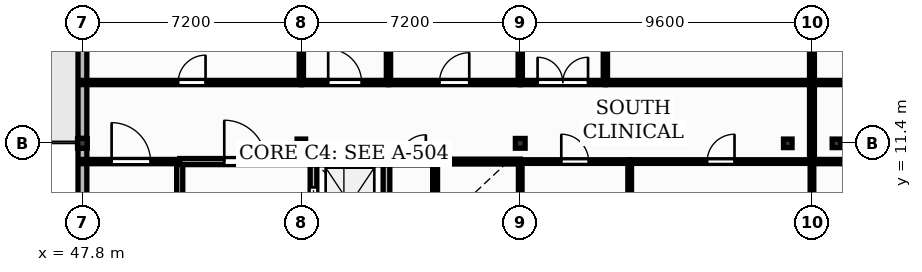
"""IFC4 building model, lengths in metres.
Left out: names, types, materials, properties, quantities, classifications, styles, units other than length and angle.
Written with IfcOpenShell. Run it as: python <this file> out.ifc"""

import sys

from ifc_helpers import new_model, si_unit, direction, frame, frame_2d, origin, origin_2d, place, context, subcontext, project, spatial, rectangle, extrude, element, fill, save


model = new_model("IFC4")
c1 = context("Model", 3, precision=1e-05, world=origin(), true_north=direction((0.0, 1.0)))
c2 = subcontext(c1, "Body", "Model", "MODEL_VIEW")
j1 = project(units=[si_unit("LENGTHUNIT", "METRE"), si_unit("PLANEANGLEUNIT", "RADIAN")], contexts=[c1])
p1 = place(None, origin())
s1 = spatial("IfcSite", under=j1, at=p1, CompositionType="ELEMENT")
p2 = place(p1, origin())
s2 = spatial("IfcBuilding", under=s1, at=p2, CompositionType="ELEMENT")
p3 = place(p2, frame((0.0, 0.0, 13.2)))
s3 = spatial("IfcBuildingStorey", under=s2, at=p3, CompositionType="ELEMENT", Elevation=13.2)
p4 = place(p3, frame((72.6, 11.4, 0.0), z_axis=(0.0, 0.0, 1.0), x_axis=(1.0, 0.0, 0.0)))
e1 = element("IfcColumn", 1, at=p4, inside=s3, PredefinedType="COLUMN", context=c2, shape_type="SweptSolid", body=[
    extrude(rectangle(XDim=0.28, YDim=0.28, at=origin_2d()), origin(), (0.0, 0.0, 1.0), 6.045),
])
p5 = place(p3, frame((47.8, 11.4, 0.0), z_axis=(0.0, 0.0, 1.0), x_axis=(1.0, 0.0, 0.0)))
e2 = element("IfcColumn", 2, at=p5, inside=s3, PredefinedType="COLUMN", context=c2, shape_type="SweptSolid", body=[
    extrude(rectangle(XDim=0.32, YDim=0.32, at=origin_2d()), origin(), (0.0, 0.0, 1.0), 6.045),
])
p6 = place(p3, frame((55.0, 11.4, 0.0), z_axis=(0.0, 0.0, 1.0), x_axis=(1.0, 0.0, 0.0)))
e3 = element("IfcColumn", 3, at=p6, inside=s3, PredefinedType="COLUMN", context=c2, shape_type="SweptSolid", body=[
    extrude(rectangle(XDim=0.28, YDim=0.28, at=origin_2d()), origin(), (0.0, 0.0, 1.0), 6.045),
])
p7 = place(p3, frame((62.2, 11.4, 0.0), z_axis=(0.0, 0.0, 1.0), x_axis=(1.0, 0.0, 0.0)))
e4 = element("IfcColumn", 4, at=p7, inside=s3, PredefinedType="COLUMN", context=c2, shape_type="SweptSolid", body=[
    extrude(rectangle(XDim=0.32, YDim=0.32, at=origin_2d()), origin(), (0.0, 0.0, 1.0), 6.045),
])
p8 = place(p3, frame((71.0, 11.4, 0.0), z_axis=(0.0, 0.0, 1.0), x_axis=(1.0, 0.0, 0.0)))
e5 = element("IfcColumn", 5, at=p8, inside=s3, PredefinedType="COLUMN", context=c2, shape_type="SweptSolid", body=[
    extrude(rectangle(XDim=0.28, YDim=0.28, at=origin_2d()), origin(), (0.0, 0.0, 1.0), 6.045),
])
p9 = place(p3, frame((47.8, 4.34, 0.0), z_axis=(0.0, 0.0, 1.0), x_axis=(0.0, 1.0, 0.0)))
e6 = element("IfcWall", 6, at=p9, inside=s3, PredefinedType="SOLIDWALL", context=c2, shape_type="SweptSolid", body=[
    extrude(rectangle(XDim=6.9, YDim=0.29, at=frame_2d((3.45, 0.0))), origin(), (0.0, 0.0, 1.0), 4.0),
])
p10 = place(p9, frame((1.77, 0.0, 0.9)))
e7 = element("IfcOpeningElement", 7, at=p10, cuts=e6, PredefinedType="OPENING", context=c2, shape_type="SweptSolid", body=[
    extrude(rectangle(XDim=1.18, YDim=2.4, at=frame_2d((0.59, 1.2))), frame((0.0, 0.155, 0.0), z_axis=(0.0, -1.0, 0.0), x_axis=(1.0, 0.0, 0.0)), (0.0, 0.0, 1.0), 0.31),
])
p11 = place(p9, frame((3.63, 0.0, 0.9)))
e8 = element("IfcOpeningElement", 8, at=p11, cuts=e6, PredefinedType="OPENING", context=c2, shape_type="SweptSolid", body=[
    extrude(rectangle(XDim=1.18, YDim=2.4, at=frame_2d((0.59, 1.2))), frame((0.0, 0.155, 0.0), z_axis=(0.0, -1.0, 0.0), x_axis=(1.0, 0.0, 0.0)), (0.0, 0.0, 1.0), 0.31),
])
p12 = place(p3, frame((47.8, 11.56, 0.0), z_axis=(0.0, 0.0, 1.0), x_axis=(0.0, 1.0, 0.0)))
e9 = element("IfcWall", 9, at=p12, inside=s3, PredefinedType="SOLIDWALL", context=c2, shape_type="SweptSolid", body=[
    extrude(rectangle(XDim=6.9, YDim=0.29, at=frame_2d((3.45, 0.0))), origin(), (0.0, 0.0, 1.0), 4.0),
])
p13 = place(p12, frame((2.925, 0.0, 0.0)))
e10 = element("IfcOpeningElement", 10, at=p13, cuts=e9, PredefinedType="OPENING", context=c2, shape_type="SweptSolid", body=[
    extrude(rectangle(XDim=1.05, YDim=2.2, at=frame_2d((0.525, 1.1))), frame((0.0, 0.155, 0.0), z_axis=(0.0, -1.0, 0.0), x_axis=(1.0, 0.0, 0.0)), (0.0, 0.0, 1.0), 0.31),
])
p14 = place(p12, frame((4.782, 0.0, 1.35)))
e11 = element("IfcOpeningElement", 11, at=p14, cuts=e9, PredefinedType="OPENING", context=c2, shape_type="SweptSolid", body=[
    extrude(rectangle(XDim=1.25, YDim=1.4, at=frame_2d((0.625, 0.7))), frame((0.0, 0.155, 0.0), z_axis=(0.0, -1.0, 0.0), x_axis=(1.0, 0.0, 0.0)), (0.0, 0.0, 1.0), 0.31),
])
p15 = place(p3, frame((55.4, 10.8, 0.0), z_axis=(0.0, 0.0, 1.0), x_axis=(1.0, 0.0, 0.0)))
e12 = element("IfcWall", 12, at=p15, inside=s3, PredefinedType="SOLIDWALL", context=c2, shape_type="SweptSolid", body=[
    extrude(rectangle(XDim=2.4, YDim=0.22, at=frame_2d((1.2, 0.0))), origin(), (0.0, 0.0, 1.0), 3.95),
])
p16 = place(p3, frame((55.4, 8.11, 0.0), z_axis=(0.0, 0.0, 1.0), x_axis=(0.0, 1.0, 0.0)))
e13 = element("IfcWall", 13, at=p16, inside=s3, PredefinedType="SOLIDWALL", context=c2, shape_type="SweptSolid", body=[
    extrude(rectangle(XDim=2.58, YDim=0.22, at=frame_2d((1.29, 0.0))), origin(), (0.0, 0.0, 1.0), 3.95),
])
p17 = place(p16, frame((0.74, 0.0, 0.0)))
e14 = element("IfcOpeningElement", 14, at=p17, cuts=e13, PredefinedType="OPENING", context=c2, shape_type="SweptSolid", body=[
    extrude(rectangle(XDim=1.1, YDim=2.15, at=frame_2d((0.55, 1.075))), frame((0.0, 0.12, 0.0), z_axis=(0.0, -1.0, 0.0), x_axis=(1.0, 0.0, 0.0)), (0.0, 0.0, 1.0), 0.24),
])
p18 = place(p3, frame((57.8, 8.11, 0.0), z_axis=(0.0, 0.0, 1.0), x_axis=(0.0, 1.0, 0.0)))
e15 = element("IfcWall", 15, at=p18, inside=s3, PredefinedType="SOLIDWALL", context=c2, shape_type="SweptSolid", body=[
    extrude(rectangle(XDim=2.58, YDim=0.22, at=frame_2d((1.29, 0.0))), origin(), (0.0, 0.0, 1.0), 3.95),
])
p19 = place(p3, frame((47.8, 10.8, 0.0), z_axis=(0.0, 0.0, 1.0), x_axis=(1.0, 0.0, 0.0)))
e16 = element("IfcWall", 16, at=p19, inside=s3, PredefinedType="PARTITIONING", context=c2, shape_type="SweptSolid", body=[
    extrude(rectangle(XDim=3.2, YDim=0.14, at=frame_2d((1.6, 0.0))), origin(), (0.0, 0.0, 1.0), 3.75),
])
p20 = place(p19, frame((0.96, 0.0, 0.0)))
e17 = element("IfcOpeningElement", 17, at=p20, cuts=e16, PredefinedType="OPENING", context=c2, shape_type="SweptSolid", body=[
    extrude(rectangle(XDim=1.28, YDim=2.2, at=frame_2d((0.64, 1.1))), frame((0.0, 0.08, 0.0), z_axis=(0.0, -1.0, 0.0), x_axis=(1.0, 0.0, 0.0)), (0.0, 0.0, 1.0), 0.16),
])
p21 = place(p3, frame((47.8, 13.4, 0.0), z_axis=(0.0, 0.0, 1.0), x_axis=(1.0, 0.0, 0.0)))
e18 = element("IfcWall", 18, at=p21, inside=s3, PredefinedType="PARTITIONING", context=c2, shape_type="SweptSolid", body=[
    extrude(rectangle(XDim=7.2, YDim=0.14, at=frame_2d((3.6, 0.0))), origin(), (0.0, 0.0, 1.0), 3.75),
])
p22 = place(p21, frame((3.15, 0.0, 0.0)))
e19 = element("IfcOpeningElement", 19, at=p22, cuts=e18, PredefinedType="OPENING", context=c2, shape_type="SweptSolid", body=[
    extrude(rectangle(XDim=0.9, YDim=2.1, at=frame_2d((0.45, 1.05))), frame((0.0, 0.08, 0.0), z_axis=(0.0, -1.0, 0.0), x_axis=(1.0, 0.0, 0.0)), (0.0, 0.0, 1.0), 0.16),
])
p23 = place(p3, frame((51.0, 5.4, 0.0), z_axis=(0.0, 0.0, 1.0), x_axis=(0.0, 1.0, 0.0)))
e20 = element("IfcWall", 20, at=p23, inside=s3, PredefinedType="PARTITIONING", context=c2, shape_type="SweptSolid", body=[
    extrude(rectangle(XDim=5.33, YDim=0.2, at=frame_2d((2.665, 0.0))), origin(), (0.0, 0.0, 1.0), 3.75),
])
p24 = place(p3, frame((51.0, 10.8, 0.0), z_axis=(0.0, 0.0, 1.0), x_axis=(1.0, 0.0, 0.0)))
e21 = element("IfcWall", 21, at=p24, inside=s3, PredefinedType="PARTITIONING", context=c2, shape_type="SweptSolid", body=[
    extrude(rectangle(XDim=4.29, YDim=0.2, at=frame_2d((2.145, 0.0))), origin(), (0.0, 0.0, 1.0), 3.75),
])
p25 = place(p24, frame((1.465, 0.0, 0.0)))
e22 = element("IfcOpeningElement", 22, at=p25, cuts=e21, PredefinedType="OPENING", context=c2, shape_type="SweptSolid", body=[
    extrude(rectangle(XDim=1.36, YDim=2.2, at=frame_2d((0.68, 1.1))), frame((0.0, 0.11, 0.0), z_axis=(0.0, -1.0, 0.0), x_axis=(1.0, 0.0, 0.0)), (0.0, 0.0, 1.0), 0.22),
])
p26 = place(p3, frame((55.0, 13.47, 0.0), z_axis=(0.0, 0.0, 1.0), x_axis=(0.0, 1.0, 0.0)))
e23 = element("IfcWall", 23, at=p26, inside=s3, PredefinedType="PARTITIONING", context=c2, shape_type="SweptSolid", body=[
    extrude(rectangle(XDim=4.97, YDim=0.14, at=frame_2d((2.485, 0.0))), origin(), (0.0, 0.0, 1.0), 3.75),
])
p27 = place(p3, frame((55.0, 13.4, 0.0), z_axis=(0.0, 0.0, 1.0), x_axis=(1.0, 0.0, 0.0)))
e24 = element("IfcWall", 24, at=p27, inside=s3, PredefinedType="PARTITIONING", context=c2, shape_type="SweptSolid", body=[
    extrude(rectangle(XDim=2.866, YDim=0.14, at=frame_2d((1.433, 0.0))), origin(), (0.0, 0.0, 1.0), 3.75),
])
p28 = place(p27, frame((0.883, 0.0, 0.0)))
e25 = element("IfcOpeningElement", 25, at=p28, cuts=e24, PredefinedType="OPENING", context=c2, shape_type="SweptSolid", body=[
    extrude(rectangle(XDim=1.1, YDim=2.1, at=frame_2d((0.55, 1.05))), frame((0.0, 0.08, 0.0), z_axis=(0.0, -1.0, 0.0), x_axis=(1.0, 0.0, 0.0)), (0.0, 0.0, 1.0), 0.16),
])
p29 = place(p3, frame((57.91, 10.8, 0.0), z_axis=(0.0, 0.0, 1.0), x_axis=(1.0, 0.0, 0.0)))
e26 = element("IfcWall", 26, at=p29, inside=s3, PredefinedType="SOLIDWALL", context=c2, shape_type="SweptSolid", body=[
    extrude(rectangle(XDim=1.49, YDim=0.22, at=frame_2d((0.745, 0.0))), origin(), (0.0, 0.0, 1.0), 3.75),
])
p30 = place(p29, frame((0.305, 0.0, 0.0)))
e27 = element("IfcOpeningElement", 27, at=p30, cuts=e26, PredefinedType="OPENING", context=c2, shape_type="SweptSolid", body=[
    extrude(rectangle(XDim=0.88, YDim=2.05, at=frame_2d((0.44, 1.025))), frame((0.0, 0.12, 0.0), z_axis=(0.0, -1.0, 0.0), x_axis=(1.0, 0.0, 0.0)), (0.0, 0.0, 1.0), 0.24),
])
p31 = place(p3, frame((57.866, 13.47, 0.0), z_axis=(0.0, 0.0, 1.0), x_axis=(0.0, 1.0, 0.0)))
e28 = element("IfcWall", 28, at=p31, inside=s3, PredefinedType="PARTITIONING", context=c2, shape_type="SweptSolid", body=[
    extrude(rectangle(XDim=5.13, YDim=0.14, at=frame_2d((2.565, 0.0))), origin(), (0.0, 0.0, 1.0), 3.75),
])
p32 = place(p3, frame((57.866, 13.4, 0.0), z_axis=(0.0, 0.0, 1.0), x_axis=(1.0, 0.0, 0.0)))
e29 = element("IfcWall", 29, at=p32, inside=s3, PredefinedType="PARTITIONING", context=c2, shape_type="SweptSolid", body=[
    extrude(rectangle(XDim=4.334, YDim=0.14, at=frame_2d((2.167, 0.0))), origin(), (0.0, 0.0, 1.0), 3.75),
])
p33 = place(p32, frame((1.677, 0.0, 0.0)))
e30 = element("IfcOpeningElement", 30, at=p33, cuts=e29, PredefinedType="OPENING", context=c2, shape_type="SweptSolid", body=[
    extrude(rectangle(XDim=0.98, YDim=2.15, at=frame_2d((0.49, 1.075))), frame((0.0, 0.08, 0.0), z_axis=(0.0, -1.0, 0.0), x_axis=(1.0, 0.0, 0.0)), (0.0, 0.0, 1.0), 0.16),
])
p34 = place(p3, frame((62.2, 10.8, 0.0), z_axis=(0.0, 0.0, 1.0), x_axis=(1.0, 0.0, 0.0)))
e31 = element("IfcWall", 31, at=p34, inside=s3, PredefinedType="PLUMBINGWALL", context=c2, shape_type="SweptSolid", body=[
    extrude(rectangle(XDim=3.6, YDim=0.12, at=frame_2d((1.8, 0.0))), origin(), (0.0, 0.0, 1.0), 3.75),
])
p35 = place(p34, frame((1.35, 0.0, 0.0)))
e32 = element("IfcOpeningElement", 32, at=p35, cuts=e31, PredefinedType="OPENING", context=c2, shape_type="SweptSolid", body=[
    extrude(rectangle(XDim=0.9, YDim=2.1, at=frame_2d((0.45, 1.05))), frame((0.0, 0.07, 0.0), z_axis=(0.0, -1.0, 0.0), x_axis=(1.0, 0.0, 0.0)), (0.0, 0.0, 1.0), 0.14),
])
p36 = place(p3, frame((62.2, 13.47, 0.0), z_axis=(0.0, 0.0, 1.0), x_axis=(0.0, 1.0, 0.0)))
e33 = element("IfcWall", 33, at=p36, inside=s3, PredefinedType="PARTITIONING", context=c2, shape_type="SweptSolid", body=[
    extrude(rectangle(XDim=4.99, YDim=0.14, at=frame_2d((2.495, 0.0))), origin(), (0.0, 0.0, 1.0), 3.75),
])
p37 = place(p3, frame((62.2, 13.4, 0.0), z_axis=(0.0, 0.0, 1.0), x_axis=(1.0, 0.0, 0.0)))
e34 = element("IfcWall", 34, at=p37, inside=s3, PredefinedType="PARTITIONING", context=c2, shape_type="SweptSolid", body=[
    extrude(rectangle(XDim=2.8, YDim=0.14, at=frame_2d((1.4, 0.0))), origin(), (0.0, 0.0, 1.0), 3.75),
])
p38 = place(p37, frame((0.57, 0.0, 0.0)))
e35 = element("IfcOpeningElement", 35, at=p38, cuts=e34, PredefinedType="OPENING", context=c2, shape_type="SweptSolid", body=[
    extrude(rectangle(XDim=1.66, YDim=2.3, at=frame_2d((0.83, 1.15))), frame((0.0, 0.08, 0.0), z_axis=(0.0, -1.0, 0.0), x_axis=(1.0, 0.0, 0.0)), (0.0, 0.0, 1.0), 0.16),
])
p39 = place(p3, frame((65.0, 13.47, 0.0), z_axis=(0.0, 0.0, 1.0), x_axis=(0.0, 1.0, 0.0)))
e36 = element("IfcWall", 36, at=p39, inside=s3, PredefinedType="PARTITIONING", context=c2, shape_type="SweptSolid", body=[
    extrude(rectangle(XDim=5.13, YDim=0.14, at=frame_2d((2.565, 0.0))), origin(), (0.0, 0.0, 1.0), 3.75),
])
p40 = place(p39, frame((2.115, 0.0, 0.0)))
e37 = element("IfcOpeningElement", 37, at=p40, cuts=e36, PredefinedType="OPENING", context=c2, shape_type="SweptSolid", body=[
    extrude(rectangle(XDim=0.9, YDim=2.1, at=frame_2d((0.45, 1.05))), frame((0.0, 0.08, 0.0), z_axis=(0.0, -1.0, 0.0), x_axis=(1.0, 0.0, 0.0)), (0.0, 0.0, 1.0), 0.16),
])
p41 = place(p3, frame((65.0, 13.4, 0.0), z_axis=(0.0, 0.0, 1.0), x_axis=(1.0, 0.0, 0.0)))
e38 = element("IfcWall", 38, at=p41, inside=s3, PredefinedType="PARTITIONING", context=c2, shape_type="SweptSolid", body=[
    extrude(rectangle(XDim=6.795, YDim=0.14, at=frame_2d((3.397, 0.0))), origin(), (0.0, 0.0, 1.0), 3.75),
])
p42 = place(p3, frame((65.8, 4.2, 0.0), z_axis=(0.0, 0.0, 1.0), x_axis=(0.0, 1.0, 0.0)))
e39 = element("IfcWall", 39, at=p42, inside=s3, PredefinedType="PLUMBINGWALL", context=c2, shape_type="SweptSolid", body=[
    extrude(rectangle(XDim=6.53, YDim=0.12, at=frame_2d((3.265, 0.0))), origin(), (0.0, 0.0, 1.0), 3.75),
])
p43 = place(p3, frame((65.8, 10.8, 0.0), z_axis=(0.0, 0.0, 1.0), x_axis=(1.0, 0.0, 0.0)))
e40 = element("IfcWall", 40, at=p43, inside=s3, PredefinedType="PLUMBINGWALL", context=c2, shape_type="SweptSolid", body=[
    extrude(rectangle(XDim=5.995, YDim=0.12, at=frame_2d((2.998, 0.0))), origin(), (0.0, 0.0, 1.0), 3.75),
])
p44 = place(p43, frame((2.548, 0.0, 0.0)))
e41 = element("IfcOpeningElement", 41, at=p44, cuts=e40, PredefinedType="OPENING", context=c2, shape_type="SweptSolid", body=[
    extrude(rectangle(XDim=0.9, YDim=2.1, at=frame_2d((0.45, 1.05))), frame((0.0, 0.07, 0.0), z_axis=(0.0, -1.0, 0.0), x_axis=(1.0, 0.0, 0.0)), (0.0, 0.0, 1.0), 0.14),
])
p45 = place(p3, frame((71.805, 10.8, 0.0), z_axis=(0.0, 0.0, 1.0), x_axis=(1.0, 0.0, 0.0)))
e42 = element("IfcWall", 42, at=p45, inside=s3, PredefinedType="PARTITIONING", context=c2, shape_type="SweptSolid", body=[
    extrude(rectangle(XDim=5.939, YDim=0.14, at=frame_2d((2.969, 0.0))), origin(), (0.0, 0.0, 1.0), 3.75),
])
p46 = place(p45, frame((2.33, 0.0, 0.0)))
e43 = element("IfcOpeningElement", 43, at=p46, cuts=e42, PredefinedType="OPENING", context=c2, shape_type="SweptSolid", body=[
    extrude(rectangle(XDim=1.28, YDim=2.2, at=frame_2d((0.64, 1.1))), frame((0.0, 0.08, 0.0), z_axis=(0.0, -1.0, 0.0), x_axis=(1.0, 0.0, 0.0)), (0.0, 0.0, 1.0), 0.16),
])
p47 = place(p3, frame((71.805, 13.4, 0.0), z_axis=(0.0, 0.0, 1.0), x_axis=(1.0, 0.0, 0.0)))
e44 = element("IfcWall", 44, at=p47, inside=s3, PredefinedType="PARTITIONING", context=c2, shape_type="SweptSolid", body=[
    extrude(rectangle(XDim=3.33, YDim=0.14, at=frame_2d((1.665, 0.0))), origin(), (0.0, 0.0, 1.0), 3.75),
])
p48 = place(p47, frame((1.115, 0.0, 0.0)))
e45 = element("IfcOpeningElement", 45, at=p48, cuts=e44, PredefinedType="OPENING", context=c2, shape_type="SweptSolid", body=[
    extrude(rectangle(XDim=1.1, YDim=2.1, at=frame_2d((0.55, 1.05))), frame((0.0, 0.08, 0.0), z_axis=(0.0, -1.0, 0.0), x_axis=(1.0, 0.0, 0.0)), (0.0, 0.0, 1.0), 0.16),
])
p49 = place(p3, frame((59.4, 8.14, 0.0), z_axis=(0.0, 0.0, 1.0), x_axis=(0.0, 1.0, 0.0)))
e46 = element("IfcWall", 46, at=p49, inside=s3, PredefinedType="PARTITIONING", context=c2, shape_type="SweptSolid", body=[
    extrude(rectangle(XDim=2.59, YDim=0.16, at=frame_2d((1.295, 0.0))), origin(), (0.0, 0.0, 1.0), 3.75),
])
p50 = place(p3, frame((59.4, 10.8, 0.0), z_axis=(0.0, 0.0, 1.0), x_axis=(1.0, 0.0, 0.0)))
e47 = element("IfcWall", 47, at=p50, inside=s3, PredefinedType="PARTITIONING", context=c2, shape_type="SweptSolid", body=[
    extrude(rectangle(XDim=2.8, YDim=0.16, at=frame_2d((1.4, 0.0))), origin(), (0.0, 0.0, 1.0), 3.75),
])
p51 = place(p3, frame((71.795, 10.87, 0.0), z_axis=(0.0, 0.0, 1.0), x_axis=(0.0, 1.0, 0.0)))
e48 = element("IfcWall", 48, at=p51, inside=s3, PredefinedType="PARTITIONING", context=c2, shape_type="SweptSolid", body=[
    extrude(rectangle(XDim=2.46, YDim=0.16, at=frame_2d((1.23, 0.0))), origin(), (0.0, 0.0, 1.0), 3.75),
])
p52 = place(p3, frame((62.2, 4.34, 0.0), z_axis=(0.0, 0.0, 1.0), x_axis=(0.0, 1.0, 0.0)))
e49 = element("IfcWall", 49, at=p52, inside=s3, PredefinedType="PLUMBINGWALL", context=c2, shape_type="SweptSolid", body=[
    extrude(rectangle(XDim=6.39, YDim=0.12, at=frame_2d((3.195, 0.0))), origin(), (0.0, 0.0, 1.0), 3.75),
])
p53 = place(p3, frame((71.795, 4.2, 0.0), z_axis=(0.0, 0.0, 1.0), x_axis=(0.0, 1.0, 0.0)))
e50 = element("IfcWall", 50, at=p53, inside=s3, PredefinedType="PLUMBINGWALL", context=c2, shape_type="SweptSolid", body=[
    extrude(rectangle(XDim=6.53, YDim=0.12, at=frame_2d((3.265, 0.0))), origin(), (0.0, 0.0, 1.0), 3.75),
])
p54 = place(p3, frame((71.795, 13.47, 0.0), z_axis=(0.0, 0.0, 1.0), x_axis=(0.0, 1.0, 0.0)))
e51 = element("IfcWall", 51, at=p54, inside=s3, PredefinedType="PARTITIONING", context=c2, shape_type="SweptSolid", body=[
    extrude(rectangle(XDim=5.13, YDim=0.16, at=frame_2d((2.565, 0.0))), origin(), (0.0, 0.0, 1.0), 3.75),
])
p55 = place(p17, origin())
e52 = element("IfcDoor", 52, at=p55, inside=s3, OperationType="SLIDING_TO_LEFT", PredefinedType="DOOR", context=c2, shape_type="SweptSolid", body=[
    extrude(rectangle(XDim=1.1, YDim=2.15, at=frame_2d((0.55, 1.075))), frame((0.0, 0.025, 0.0), z_axis=(0.0, -1.0, 0.0), x_axis=(1.0, 0.0, 0.0)), (0.0, 0.0, 1.0), 0.05),
])
fill(e14, e52)
p56 = place(p25, origin())
e53 = element("IfcDoor", 53, at=p56, inside=s3, OperationType="SINGLE_SWING_LEFT", PredefinedType="DOOR", context=c2, shape_type="SweptSolid", body=[
    extrude(rectangle(XDim=1.36, YDim=2.2, at=frame_2d((0.68, 1.1))), frame((0.0, 0.025, 0.0), z_axis=(0.0, -1.0, 0.0), x_axis=(1.0, 0.0, 0.0)), (0.0, 0.0, 1.0), 0.05),
])
fill(e22, e53)
p57 = place(p38, origin())
e54 = element("IfcDoor", 54, at=p57, inside=s3, OperationType="DOUBLE_DOOR_SINGLE_SWING", PredefinedType="DOOR", context=c2, shape_type="SweptSolid", body=[
    extrude(rectangle(XDim=1.66, YDim=2.3, at=frame_2d((0.83, 1.15))), frame((0.0, 0.025, 0.0), z_axis=(0.0, -1.0, 0.0), x_axis=(1.0, 0.0, 0.0)), (0.0, 0.0, 1.0), 0.05),
])
fill(e35, e54)
p58 = place(p30, origin())
e55 = element("IfcDoor", 55, at=p58, inside=s3, OperationType="SINGLE_SWING_RIGHT", PredefinedType="DOOR", context=c2, shape_type="SweptSolid", body=[
    extrude(rectangle(XDim=0.88, YDim=2.05, at=frame_2d((0.44, 1.025))), frame((0.0, 0.025, 0.0), z_axis=(0.0, -1.0, 0.0), x_axis=(1.0, 0.0, 0.0)), (0.0, 0.0, 1.0), 0.05),
])
fill(e27, e55)
p59 = place(p35, origin())
e56 = element("IfcDoor", 56, at=p59, inside=s3, OperationType="SINGLE_SWING_LEFT", PredefinedType="DOOR", context=c2, shape_type="SweptSolid", body=[
    extrude(rectangle(XDim=0.9, YDim=2.1, at=frame_2d((0.45, 1.05))), frame((0.0, 0.025, 0.0), z_axis=(0.0, -1.0, 0.0), x_axis=(1.0, 0.0, 0.0)), (0.0, 0.0, 1.0), 0.05),
])
fill(e32, e56)
p60 = place(p44, origin())
e57 = element("IfcDoor", 57, at=p60, inside=s3, OperationType="SINGLE_SWING_RIGHT", PredefinedType="DOOR", context=c2, shape_type="SweptSolid", body=[
    extrude(rectangle(XDim=0.9, YDim=2.1, at=frame_2d((0.45, 1.05))), frame((0.0, 0.025, 0.0), z_axis=(0.0, -1.0, 0.0), x_axis=(1.0, 0.0, 0.0)), (0.0, 0.0, 1.0), 0.05),
])
fill(e41, e57)
p61 = place(p20, origin())
e58 = element("IfcDoor", 58, at=p61, inside=s3, OperationType="SINGLE_SWING_LEFT", PredefinedType="DOOR", context=c2, shape_type="SweptSolid", body=[
    extrude(rectangle(XDim=1.28, YDim=2.2, at=frame_2d((0.64, 1.1))), frame((0.0, 0.025, 0.0), z_axis=(0.0, -1.0, 0.0), x_axis=(1.0, 0.0, 0.0)), (0.0, 0.0, 1.0), 0.05),
])
fill(e17, e58)
p62 = place(p22, origin())
e59 = element("IfcDoor", 59, at=p62, inside=s3, OperationType="SINGLE_SWING_RIGHT", PredefinedType="DOOR", context=c2, shape_type="SweptSolid", body=[
    extrude(rectangle(XDim=0.9, YDim=2.1, at=frame_2d((0.45, 1.05))), frame((0.0, 0.025, 0.0), z_axis=(0.0, -1.0, 0.0), x_axis=(1.0, 0.0, 0.0)), (0.0, 0.0, 1.0), 0.05),
])
fill(e19, e59)
p63 = place(p28, origin())
e60 = element("IfcDoor", 60, at=p63, inside=s3, OperationType="SINGLE_SWING_LEFT", PredefinedType="DOOR", context=c2, shape_type="SweptSolid", body=[
    extrude(rectangle(XDim=1.1, YDim=2.1, at=frame_2d((0.55, 1.05))), frame((0.0, 0.025, 0.0), z_axis=(0.0, -1.0, 0.0), x_axis=(1.0, 0.0, 0.0)), (0.0, 0.0, 1.0), 0.05),
])
fill(e25, e60)
p64 = place(p33, origin())
e61 = element("IfcDoor", 61, at=p64, inside=s3, OperationType="SINGLE_SWING_RIGHT", PredefinedType="DOOR", context=c2, shape_type="SweptSolid", body=[
    extrude(rectangle(XDim=0.98, YDim=2.15, at=frame_2d((0.49, 1.075))), frame((0.0, 0.025, 0.0), z_axis=(0.0, -1.0, 0.0), x_axis=(1.0, 0.0, 0.0)), (0.0, 0.0, 1.0), 0.05),
])
fill(e30, e61)
save(model, sys.argv[1])
